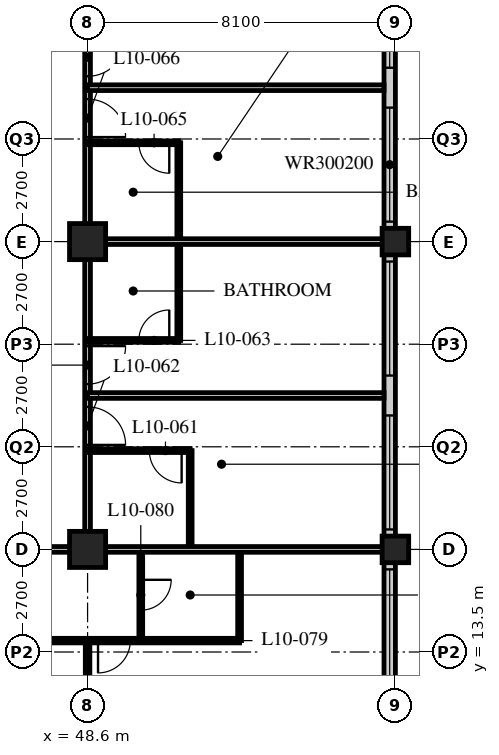
"""IFC4 building model, lengths in metres.
Left out: names, types, materials, properties, quantities, classifications, styles, units other than length and angle.
Written with IfcOpenShell. Run it as: python <this file> out.ifc"""

import sys

from ifc_helpers import new_model, si_unit, direction, frame, frame_2d, origin, origin_2d, place, context, subcontext, project, spatial, rectangle, hollow_rectangle, extrude, element, fill, save


model = new_model("IFC4")
c1 = context("Model", 3, precision=1e-05, world=origin(), true_north=direction((0.0, 1.0)))
c2 = subcontext(c1, "Body", "Model", "MODEL_VIEW")
j1 = project(units=[si_unit("LENGTHUNIT", "METRE"), si_unit("PLANEANGLEUNIT", "RADIAN")], contexts=[c1])
p1 = place(None, origin())
s1 = spatial("IfcSite", under=j1, at=p1, CompositionType="ELEMENT")
p2 = place(p1, origin())
s2 = spatial("IfcBuilding", under=s1, at=p2, CompositionType="ELEMENT")
p3 = place(p2, frame((0.0, 0.0, 46.6)))
s3 = spatial("IfcBuildingStorey", under=s2, at=p3, CompositionType="ELEMENT", Elevation=46.6)
for number, where, z_axis, x_axis in (
    (1, (48.6, 16.2, 0.0), (0.0, 0.0, 1.0), (1.0, 0.0, 0.0)),
    (2, (48.6, 24.3, 0.0), (0.0, 0.0, 1.0), (1.0, 0.0, 0.0)),
):
    element("IfcColumn", number, at=place(p3, frame(where, z_axis=z_axis, x_axis=x_axis)), inside=s3, PredefinedType="COLUMN", context=c2, shape_type="SweptSolid", body=[
        extrude(hollow_rectangle(XDim=0.95, YDim=0.95, WallThickness=0.095, at=origin_2d()), origin(), (0.0, 0.0, 1.0), 3.4),
    ])
for number, where, z_axis, x_axis in (
    (3, (56.7, 16.2, 0.0), (0.0, 0.0, 1.0), (1.0, 0.0, 0.0)),
    (4, (56.7, 24.3, 0.0), (0.0, 0.0, 1.0), (1.0, 0.0, 0.0)),
):
    element("IfcColumn", number, at=place(p3, frame(where, z_axis=z_axis, x_axis=x_axis)), inside=s3, PredefinedType="COLUMN", context=c2, shape_type="SweptSolid", body=[
        extrude(hollow_rectangle(XDim=0.7, YDim=0.7, WallThickness=0.06, at=origin_2d()), origin(), (0.0, 0.0, 1.0), 3.4),
    ])
p4 = place(p3, frame((56.55, 8.4, 0.0), z_axis=(0.0, 0.0, 1.0), x_axis=(0.0, 1.0, 0.0)))
e5 = element("IfcWall", 5, at=p4, inside=s3, PredefinedType="SOLIDWALL", context=c2, shape_type="SweptSolid", body=[
    extrude(rectangle(XDim=32.1, YDim=0.3, at=frame_2d((16.05, 0.0))), origin(), (0.0, 0.0, 1.0), 3.19),
])
p5 = place(p4, frame((0.225, 0.0, 0.9)))
e6 = element("IfcOpeningElement", 6, at=p5, cuts=e5, PredefinedType="OPENING", context=c2, shape_type="SweptSolid", body=[
    extrude(rectangle(XDim=3.0, YDim=2.0, at=frame_2d((1.5, 1.0))), frame((0.0, 0.16, 0.0), z_axis=(0.0, -1.0, 0.0), x_axis=(1.0, 0.0, 0.0)), (0.0, 0.0, 1.0), 0.32),
])
p6 = place(p4, frame((4.275, 0.0, 0.9)))
e7 = element("IfcOpeningElement", 7, at=p6, cuts=e5, PredefinedType="OPENING", context=c2, shape_type="SweptSolid", body=[
    extrude(rectangle(XDim=3.0, YDim=2.0, at=frame_2d((1.5, 1.0))), frame((0.0, 0.16, 0.0), z_axis=(0.0, -1.0, 0.0), x_axis=(1.0, 0.0, 0.0)), (0.0, 0.0, 1.0), 0.32),
])
p7 = place(p4, frame((8.325, 0.0, 0.9)))
e8 = element("IfcOpeningElement", 8, at=p7, cuts=e5, PredefinedType="OPENING", context=c2, shape_type="SweptSolid", body=[
    extrude(rectangle(XDim=3.0, YDim=2.0, at=frame_2d((1.5, 1.0))), frame((0.0, 0.16, 0.0), z_axis=(0.0, -1.0, 0.0), x_axis=(1.0, 0.0, 0.0)), (0.0, 0.0, 1.0), 0.32),
])
p8 = place(p4, frame((12.375, 0.0, 0.9)))
e9 = element("IfcOpeningElement", 9, at=p8, cuts=e5, PredefinedType="OPENING", context=c2, shape_type="SweptSolid", body=[
    extrude(rectangle(XDim=3.0, YDim=2.0, at=frame_2d((1.5, 1.0))), frame((0.0, 0.16, 0.0), z_axis=(0.0, -1.0, 0.0), x_axis=(1.0, 0.0, 0.0)), (0.0, 0.0, 1.0), 0.32),
])
p9 = place(p4, frame((16.425, 0.0, 0.9)))
e10 = element("IfcOpeningElement", 10, at=p9, cuts=e5, PredefinedType="OPENING", context=c2, shape_type="SweptSolid", body=[
    extrude(rectangle(XDim=3.0, YDim=2.0, at=frame_2d((1.5, 1.0))), frame((0.0, 0.16, 0.0), z_axis=(0.0, -1.0, 0.0), x_axis=(1.0, 0.0, 0.0)), (0.0, 0.0, 1.0), 0.32),
])
p10 = place(p4, frame((20.475, 0.0, 0.9)))
e11 = element("IfcOpeningElement", 11, at=p10, cuts=e5, PredefinedType="OPENING", context=c2, shape_type="SweptSolid", body=[
    extrude(rectangle(XDim=3.0, YDim=2.0, at=frame_2d((1.5, 1.0))), frame((0.0, 0.16, 0.0), z_axis=(0.0, -1.0, 0.0), x_axis=(1.0, 0.0, 0.0)), (0.0, 0.0, 1.0), 0.32),
])
p11 = place(p4, frame((24.525, 0.0, 0.9)))
e12 = element("IfcOpeningElement", 12, at=p11, cuts=e5, PredefinedType="OPENING", context=c2, shape_type="SweptSolid", body=[
    extrude(rectangle(XDim=3.0, YDim=2.0, at=frame_2d((1.5, 1.0))), frame((0.0, 0.16, 0.0), z_axis=(0.0, -1.0, 0.0), x_axis=(1.0, 0.0, 0.0)), (0.0, 0.0, 1.0), 0.32),
])
p12 = place(p4, frame((28.575, 0.0, 0.9)))
e13 = element("IfcOpeningElement", 13, at=p12, cuts=e5, PredefinedType="OPENING", context=c2, shape_type="SweptSolid", body=[
    extrude(rectangle(XDim=3.0, YDim=2.0, at=frame_2d((1.5, 1.0))), frame((0.0, 0.16, 0.0), z_axis=(0.0, -1.0, 0.0), x_axis=(1.0, 0.0, 0.0)), (0.0, 0.0, 1.0), 0.32),
])
p13 = place(p3, frame((8.1, 16.2, 0.0), z_axis=(0.0, 0.0, 1.0), x_axis=(1.0, 0.0, 0.0)))
e14 = element("IfcWall", 14, at=p13, inside=s3, PredefinedType="PARTITIONING", context=c2, shape_type="SweptSolid", body=[
    extrude(rectangle(XDim=40.5, YDim=0.15, at=frame_2d((20.25, 0.0))), origin(), (0.0, 0.0, 1.0), 2.578),
])
p14 = place(p13, frame((4.35, 0.0, 0.0)))
e15 = element("IfcOpeningElement", 15, at=p14, cuts=e14, PredefinedType="OPENING", context=c2, shape_type="SweptSolid", body=[
    extrude(rectangle(XDim=1.0, YDim=2.1, at=frame_2d((0.5, 1.05))), frame((0.0, 0.085, 0.0), z_axis=(0.0, -1.0, 0.0), x_axis=(1.0, 0.0, 0.0)), (0.0, 0.0, 1.0), 0.17),
])
p15 = place(p13, frame((10.85, 0.0, 0.0)))
e16 = element("IfcOpeningElement", 16, at=p15, cuts=e14, PredefinedType="OPENING", context=c2, shape_type="SweptSolid", body=[
    extrude(rectangle(XDim=1.0, YDim=2.1, at=frame_2d((0.5, 1.05))), frame((0.0, 0.085, 0.0), z_axis=(0.0, -1.0, 0.0), x_axis=(1.0, 0.0, 0.0)), (0.0, 0.0, 1.0), 0.17),
])
p16 = place(p13, frame((12.75, 0.0, 0.0)))
e17 = element("IfcOpeningElement", 17, at=p16, cuts=e14, PredefinedType="OPENING", context=c2, shape_type="SweptSolid", body=[
    extrude(rectangle(XDim=1.0, YDim=2.1, at=frame_2d((0.5, 1.05))), frame((0.0, 0.085, 0.0), z_axis=(0.0, -1.0, 0.0), x_axis=(1.0, 0.0, 0.0)), (0.0, 0.0, 1.0), 0.17),
])
p17 = place(p13, frame((18.95, 0.0, 0.0)))
e18 = element("IfcOpeningElement", 18, at=p17, cuts=e14, PredefinedType="OPENING", context=c2, shape_type="SweptSolid", body=[
    extrude(rectangle(XDim=1.0, YDim=2.1, at=frame_2d((0.5, 1.05))), frame((0.0, 0.085, 0.0), z_axis=(0.0, -1.0, 0.0), x_axis=(1.0, 0.0, 0.0)), (0.0, 0.0, 1.0), 0.17),
])
p18 = place(p13, frame((20.55, 0.0, 0.0)))
e19 = element("IfcOpeningElement", 19, at=p18, cuts=e14, PredefinedType="OPENING", context=c2, shape_type="SweptSolid", body=[
    extrude(rectangle(XDim=1.0, YDim=2.1, at=frame_2d((0.5, 1.05))), frame((0.0, 0.085, 0.0), z_axis=(0.0, -1.0, 0.0), x_axis=(1.0, 0.0, 0.0)), (0.0, 0.0, 1.0), 0.17),
])
p19 = place(p13, frame((27.05, 0.0, 0.0)))
e20 = element("IfcOpeningElement", 20, at=p19, cuts=e14, PredefinedType="OPENING", context=c2, shape_type="SweptSolid", body=[
    extrude(rectangle(XDim=1.0, YDim=2.1, at=frame_2d((0.5, 1.05))), frame((0.0, 0.085, 0.0), z_axis=(0.0, -1.0, 0.0), x_axis=(1.0, 0.0, 0.0)), (0.0, 0.0, 1.0), 0.17),
])
p20 = place(p13, frame((28.95, 0.0, 0.0)))
e21 = element("IfcOpeningElement", 21, at=p20, cuts=e14, PredefinedType="OPENING", context=c2, shape_type="SweptSolid", body=[
    extrude(rectangle(XDim=1.0, YDim=2.1, at=frame_2d((0.5, 1.05))), frame((0.0, 0.085, 0.0), z_axis=(0.0, -1.0, 0.0), x_axis=(1.0, 0.0, 0.0)), (0.0, 0.0, 1.0), 0.17),
])
p21 = place(p13, frame((34.85, 0.0, 0.0)))
e22 = element("IfcOpeningElement", 22, at=p21, cuts=e14, PredefinedType="OPENING", context=c2, shape_type="SweptSolid", body=[
    extrude(rectangle(XDim=1.0, YDim=2.1, at=frame_2d((0.5, 1.05))), frame((0.0, 0.085, 0.0), z_axis=(0.0, -1.0, 0.0), x_axis=(1.0, 0.0, 0.0)), (0.0, 0.0, 1.0), 0.17),
])
p22 = place(p13, frame((1.525, 0.0, 0.0)))
e23 = element("IfcOpeningElement", 23, at=p22, cuts=e14, PredefinedType="OPENING", context=c2, shape_type="SweptSolid", body=[
    extrude(rectangle(XDim=1.0, YDim=2.1, at=frame_2d((0.5, 1.05))), frame((0.0, 0.085, 0.0), z_axis=(0.0, -1.0, 0.0), x_axis=(1.0, 0.0, 0.0)), (0.0, 0.0, 1.0), 0.17),
])
p23 = place(p13, frame((37.975, 0.0, 0.0)))
e24 = element("IfcOpeningElement", 24, at=p23, cuts=e14, PredefinedType="OPENING", context=c2, shape_type="SweptSolid", body=[
    extrude(rectangle(XDim=1.0, YDim=2.1, at=frame_2d((0.5, 1.05))), frame((0.0, 0.085, 0.0), z_axis=(0.0, -1.0, 0.0), x_axis=(1.0, 0.0, 0.0)), (0.0, 0.0, 1.0), 0.17),
])
p24 = place(p3, frame((48.6, 16.2, 0.0), z_axis=(0.0, 0.0, 1.0), x_axis=(0.0, 1.0, 0.0)))
e25 = element("IfcWall", 25, at=p24, inside=s3, PredefinedType="PARTITIONING", context=c2, shape_type="SweptSolid", body=[
    extrude(rectangle(XDim=26.1, YDim=0.15, at=frame_2d((13.05, 0.0))), origin(), (0.0, 0.0, 1.0), 2.578),
])
p25 = place(p24, frame((2.75, 0.0, 0.0)))
e26 = element("IfcOpeningElement", 26, at=p25, cuts=e25, PredefinedType="OPENING", context=c2, shape_type="SweptSolid", body=[
    extrude(rectangle(XDim=1.0, YDim=2.1, at=frame_2d((0.5, 1.05))), frame((0.0, 0.085, 0.0), z_axis=(0.0, -1.0, 0.0), x_axis=(1.0, 0.0, 0.0)), (0.0, 0.0, 1.0), 0.17),
])
p26 = place(p24, frame((4.35, 0.0, 0.0)))
e27 = element("IfcOpeningElement", 27, at=p26, cuts=e25, PredefinedType="OPENING", context=c2, shape_type="SweptSolid", body=[
    extrude(rectangle(XDim=1.0, YDim=2.1, at=frame_2d((0.5, 1.05))), frame((0.0, 0.085, 0.0), z_axis=(0.0, -1.0, 0.0), x_axis=(1.0, 0.0, 0.0)), (0.0, 0.0, 1.0), 0.17),
])
p27 = place(p24, frame((10.85, 0.0, 0.0)))
e28 = element("IfcOpeningElement", 28, at=p27, cuts=e25, PredefinedType="OPENING", context=c2, shape_type="SweptSolid", body=[
    extrude(rectangle(XDim=1.0, YDim=2.1, at=frame_2d((0.5, 1.05))), frame((0.0, 0.085, 0.0), z_axis=(0.0, -1.0, 0.0), x_axis=(1.0, 0.0, 0.0)), (0.0, 0.0, 1.0), 0.17),
])
p28 = place(p24, frame((12.45, 0.0, 0.0)))
e29 = element("IfcOpeningElement", 29, at=p28, cuts=e25, PredefinedType="OPENING", context=c2, shape_type="SweptSolid", body=[
    extrude(rectangle(XDim=1.0, YDim=2.1, at=frame_2d((0.5, 1.05))), frame((0.0, 0.085, 0.0), z_axis=(0.0, -1.0, 0.0), x_axis=(1.0, 0.0, 0.0)), (0.0, 0.0, 1.0), 0.17),
])
p29 = place(p24, frame((18.65, 0.0, 0.0)))
e30 = element("IfcOpeningElement", 30, at=p29, cuts=e25, PredefinedType="OPENING", context=c2, shape_type="SweptSolid", body=[
    extrude(rectangle(XDim=1.0, YDim=2.1, at=frame_2d((0.5, 1.05))), frame((0.0, 0.085, 0.0), z_axis=(0.0, -1.0, 0.0), x_axis=(1.0, 0.0, 0.0)), (0.0, 0.0, 1.0), 0.17),
])
p30 = place(p24, frame((22.7, 0.0, 0.0)))
e31 = element("IfcOpeningElement", 31, at=p30, cuts=e25, PredefinedType="OPENING", context=c2, shape_type="SweptSolid", body=[
    extrude(rectangle(XDim=1.0, YDim=2.1, at=frame_2d((0.5, 1.05))), frame((0.0, 0.085, 0.0), z_axis=(0.0, -1.0, 0.0), x_axis=(1.0, 0.0, 0.0)), (0.0, 0.0, 1.0), 0.17),
])
p31 = place(p3, frame((51.3, 16.2, 0.0), z_axis=(0.0, 0.0, 1.0), x_axis=(0.0, 1.0, 0.0)))
e32 = element("IfcWall", 32, at=p31, inside=s3, PredefinedType="PARTITIONING", context=c2, shape_type="SweptSolid", body=[
    extrude(rectangle(XDim=2.6, YDim=0.1, at=frame_2d((1.3, 0.0))), origin(), (0.0, 0.0, 1.0), 3.19),
])
p32 = place(p3, frame((48.6, 18.8, 0.0), z_axis=(0.0, 0.0, 1.0), x_axis=(1.0, 0.0, 0.0)))
e33 = element("IfcWall", 33, at=p32, inside=s3, PredefinedType="PARTITIONING", context=c2, shape_type="SweptSolid", body=[
    extrude(rectangle(XDim=2.7, YDim=0.1, at=frame_2d((1.35, 0.0))), origin(), (0.0, 0.0, 1.0), 3.19),
])
p33 = place(p32, frame((1.625, 0.0, 0.0)))
e34 = element("IfcOpeningElement", 34, at=p33, cuts=e33, PredefinedType="OPENING", context=c2, shape_type="SweptSolid", body=[
    extrude(rectangle(XDim=0.85, YDim=2.1, at=frame_2d((0.425, 1.05))), frame((0.0, 0.06, 0.0), z_axis=(0.0, -1.0, 0.0), x_axis=(1.0, 0.0, 0.0)), (0.0, 0.0, 1.0), 0.12),
])
p34 = place(p3, frame((48.6, 20.25, 0.0), z_axis=(0.0, 0.0, 1.0), x_axis=(1.0, 0.0, 0.0)))
e35 = element("IfcWall", 35, at=p34, inside=s3, PredefinedType="PARTITIONING", context=c2, shape_type="SweptSolid", body=[
    extrude(rectangle(XDim=7.8, YDim=0.15, at=frame_2d((3.9, 0.0))), origin(), (0.0, 0.0, 1.0), 3.19),
])
p35 = place(p3, frame((51.0, 21.7, 0.0), z_axis=(0.0, 0.0, 1.0), x_axis=(0.0, 1.0, 0.0)))
e36 = element("IfcWall", 36, at=p35, inside=s3, PredefinedType="PARTITIONING", context=c2, shape_type="SweptSolid", body=[
    extrude(rectangle(XDim=5.2, YDim=0.1, at=frame_2d((2.6, 0.0))), origin(), (0.0, 0.0, 1.0), 3.19),
])
p36 = place(p3, frame((48.6, 21.7, 0.0), z_axis=(0.0, 0.0, 1.0), x_axis=(1.0, 0.0, 0.0)))
e37 = element("IfcWall", 37, at=p36, inside=s3, PredefinedType="PARTITIONING", context=c2, shape_type="SweptSolid", body=[
    extrude(rectangle(XDim=2.4, YDim=0.1, at=frame_2d((1.2, 0.0))), origin(), (0.0, 0.0, 1.0), 3.19),
])
p37 = place(p36, frame((1.35, 0.0, 0.0)))
e38 = element("IfcOpeningElement", 38, at=p37, cuts=e37, PredefinedType="OPENING", context=c2, shape_type="SweptSolid", body=[
    extrude(rectangle(XDim=0.8, YDim=2.1, at=frame_2d((0.4, 1.05))), frame((0.0, 0.06, 0.0), z_axis=(0.0, -1.0, 0.0), x_axis=(1.0, 0.0, 0.0)), (0.0, 0.0, 1.0), 0.12),
])
p38 = place(p3, frame((48.6, 24.3, 0.0), z_axis=(0.0, 0.0, 1.0), x_axis=(1.0, 0.0, 0.0)))
e39 = element("IfcWall", 39, at=p38, inside=s3, PredefinedType="PARTITIONING", context=c2, shape_type="SweptSolid", body=[
    extrude(rectangle(XDim=7.8, YDim=0.15, at=frame_2d((3.9, 0.0))), origin(), (0.0, 0.0, 1.0), 2.578),
])
p39 = place(p3, frame((48.6, 26.9, 0.0), z_axis=(0.0, 0.0, 1.0), x_axis=(1.0, 0.0, 0.0)))
e40 = element("IfcWall", 40, at=p39, inside=s3, PredefinedType="PARTITIONING", context=c2, shape_type="SweptSolid", body=[
    extrude(rectangle(XDim=2.4, YDim=0.1, at=frame_2d((1.2, 0.0))), origin(), (0.0, 0.0, 1.0), 3.19),
])
p40 = place(p39, frame((1.35, 0.0, 0.0)))
e41 = element("IfcOpeningElement", 41, at=p40, cuts=e40, PredefinedType="OPENING", context=c2, shape_type="SweptSolid", body=[
    extrude(rectangle(XDim=0.8, YDim=2.1, at=frame_2d((0.4, 1.05))), frame((0.0, 0.06, 0.0), z_axis=(0.0, -1.0, 0.0), x_axis=(1.0, 0.0, 0.0)), (0.0, 0.0, 1.0), 0.12),
])
p41 = place(p3, frame((48.6, 28.35, 0.0), z_axis=(0.0, 0.0, 1.0), x_axis=(1.0, 0.0, 0.0)))
e42 = element("IfcWall", 42, at=p41, inside=s3, PredefinedType="PARTITIONING", context=c2, shape_type="SweptSolid", body=[
    extrude(rectangle(XDim=7.8, YDim=0.15, at=frame_2d((3.9, 0.0))), origin(), (0.0, 0.0, 1.0), 3.19),
])
p42 = place(p3, frame((44.55, 13.8, 0.0), z_axis=(0.0, 0.0, 1.0), x_axis=(1.0, 0.0, 0.0)))
e43 = element("IfcWall", 43, at=p42, inside=s3, PredefinedType="PARTITIONING", context=c2, shape_type="SweptSolid", body=[
    extrude(rectangle(XDim=8.05, YDim=0.12, at=frame_2d((4.025, 0.0))), origin(), (0.0, 0.0, 1.0), 3.19),
])
p43 = place(p42, frame((0.475, 0.0, 0.0)))
e44 = element("IfcOpeningElement", 44, at=p43, cuts=e43, PredefinedType="OPENING", context=c2, shape_type="SweptSolid", body=[
    extrude(rectangle(XDim=0.85, YDim=2.1, at=frame_2d((0.425, 1.05))), frame((0.0, 0.07, 0.0), z_axis=(0.0, -1.0, 0.0), x_axis=(1.0, 0.0, 0.0)), (0.0, 0.0, 1.0), 0.14),
])
p44 = place(p42, frame((4.325, 0.0, 0.0)))
e45 = element("IfcOpeningElement", 45, at=p44, cuts=e43, PredefinedType="OPENING", context=c2, shape_type="SweptSolid", body=[
    extrude(rectangle(XDim=0.85, YDim=2.1, at=frame_2d((0.425, 1.05))), frame((0.0, 0.07, 0.0), z_axis=(0.0, -1.0, 0.0), x_axis=(1.0, 0.0, 0.0)), (0.0, 0.0, 1.0), 0.14),
])
p45 = place(p3, frame((50.0, 16.2, 0.0), z_axis=(0.0, 0.0, 1.0), x_axis=(0.0, -1.0, 0.0)))
e46 = element("IfcWall", 46, at=p45, inside=s3, PredefinedType="PARTITIONING", context=c2, shape_type="SweptSolid", body=[
    extrude(rectangle(XDim=2.4, YDim=0.1, at=frame_2d((1.2, 0.0))), origin(), (0.0, 0.0, 1.0), 3.19),
])
p46 = place(p45, frame((0.8, 0.0, 0.0)))
e47 = element("IfcOpeningElement", 47, at=p46, cuts=e46, PredefinedType="OPENING", context=c2, shape_type="SweptSolid", body=[
    extrude(rectangle(XDim=0.8, YDim=2.1, at=frame_2d((0.4, 1.05))), frame((0.0, 0.06, 0.0), z_axis=(0.0, -1.0, 0.0), x_axis=(1.0, 0.0, 0.0)), (0.0, 0.0, 1.0), 0.12),
])
p47 = place(p3, frame((52.6, 16.2, 0.0), z_axis=(0.0, 0.0, 1.0), x_axis=(0.0, -1.0, 0.0)))
e48 = element("IfcWall", 48, at=p47, inside=s3, PredefinedType="PARTITIONING", context=c2, shape_type="SweptSolid", body=[
    extrude(rectangle(XDim=2.4, YDim=0.1, at=frame_2d((1.2, 0.0))), origin(), (0.0, 0.0, 1.0), 3.19),
])
p48 = place(p3, frame((48.6, 13.8, 0.0), z_axis=(0.0, 0.0, 1.0), x_axis=(0.0, -1.0, 0.0)))
e49 = element("IfcWall", 49, at=p48, inside=s3, PredefinedType="PARTITIONING", context=c2, shape_type="SweptSolid", body=[
    extrude(rectangle(XDim=9.45, YDim=0.12, at=frame_2d((4.725, 0.0))), origin(), (0.0, 0.0, 1.0), 2.578),
])
p49 = place(p3, frame((48.6, 16.2, 0.0), z_axis=(0.0, 0.0, 1.0), x_axis=(1.0, 0.0, 0.0)))
e50 = element("IfcWall", 50, at=p49, inside=s3, PredefinedType="PARTITIONING", context=c2, shape_type="SweptSolid", body=[
    extrude(rectangle(XDim=7.8, YDim=0.15, at=frame_2d((3.9, 0.0))), origin(), (0.0, 0.0, 1.0), 2.578),
])
p50 = place(p6, origin())
e51 = element("IfcWindow", 51, at=p50, inside=s3, PartitioningType="SINGLE_PANEL", PredefinedType="WINDOW", context=c2, shape_type="SweptSolid", body=[
    extrude(rectangle(XDim=3.0, YDim=2.0, at=frame_2d((1.5, 1.0))), frame((0.0, 0.03, 0.0), z_axis=(0.0, -1.0, 0.0), x_axis=(1.0, 0.0, 0.0)), (0.0, 0.0, 1.0), 0.06),
])
fill(e7, e51)
p51 = place(p7, origin())
e52 = element("IfcWindow", 52, at=p51, inside=s3, PartitioningType="SINGLE_PANEL", PredefinedType="WINDOW", context=c2, shape_type="SweptSolid", body=[
    extrude(rectangle(XDim=3.0, YDim=2.0, at=frame_2d((1.5, 1.0))), frame((0.0, 0.03, 0.0), z_axis=(0.0, -1.0, 0.0), x_axis=(1.0, 0.0, 0.0)), (0.0, 0.0, 1.0), 0.06),
])
fill(e8, e52)
p52 = place(p8, origin())
e53 = element("IfcWindow", 53, at=p52, inside=s3, PartitioningType="SINGLE_PANEL", PredefinedType="WINDOW", context=c2, shape_type="SweptSolid", body=[
    extrude(rectangle(XDim=3.0, YDim=2.0, at=frame_2d((1.5, 1.0))), frame((0.0, 0.03, 0.0), z_axis=(0.0, -1.0, 0.0), x_axis=(1.0, 0.0, 0.0)), (0.0, 0.0, 1.0), 0.06),
])
fill(e9, e53)
p53 = place(p9, origin())
e54 = element("IfcWindow", 54, at=p53, inside=s3, PartitioningType="SINGLE_PANEL", PredefinedType="WINDOW", context=c2, shape_type="SweptSolid", body=[
    extrude(rectangle(XDim=3.0, YDim=2.0, at=frame_2d((1.5, 1.0))), frame((0.0, 0.03, 0.0), z_axis=(0.0, -1.0, 0.0), x_axis=(1.0, 0.0, 0.0)), (0.0, 0.0, 1.0), 0.06),
])
fill(e10, e54)
p54 = place(p10, origin())
e55 = element("IfcWindow", 55, at=p54, inside=s3, PartitioningType="SINGLE_PANEL", PredefinedType="WINDOW", context=c2, shape_type="SweptSolid", body=[
    extrude(rectangle(XDim=3.0, YDim=2.0, at=frame_2d((1.5, 1.0))), frame((0.0, 0.03, 0.0), z_axis=(0.0, -1.0, 0.0), x_axis=(1.0, 0.0, 0.0)), (0.0, 0.0, 1.0), 0.06),
])
fill(e11, e55)
p55 = place(p33, origin())
e56 = element("IfcDoor", 56, at=p55, inside=s3, OperationType="SINGLE_SWING_LEFT", PredefinedType="DOOR", context=c2, shape_type="SweptSolid", body=[
    extrude(rectangle(XDim=0.85, YDim=2.1, at=frame_2d((0.425, 1.05))), frame((0.0, 0.025, 0.0), z_axis=(0.0, -1.0, 0.0), x_axis=(1.0, 0.0, 0.0)), (0.0, 0.0, 1.0), 0.05),
])
fill(e34, e56)
p56 = place(p25, origin())
e57 = element("IfcDoor", 57, at=p56, inside=s3, OperationType="SINGLE_SWING_RIGHT", PredefinedType="DOOR", context=c2, shape_type="SweptSolid", body=[
    extrude(rectangle(XDim=1.0, YDim=2.1, at=frame_2d((0.5, 1.05))), frame((0.0, 0.025, 0.0), z_axis=(0.0, -1.0, 0.0), x_axis=(1.0, 0.0, 0.0)), (0.0, 0.0, 1.0), 0.05),
])
fill(e26, e57)
p57 = place(p37, origin())
e58 = element("IfcDoor", 58, at=p57, inside=s3, OperationType="SINGLE_SWING_RIGHT", PredefinedType="DOOR", context=c2, shape_type="SweptSolid", body=[
    extrude(rectangle(XDim=0.8, YDim=2.1, at=frame_2d((0.4, 1.05))), frame((0.0, 0.025, 0.0), z_axis=(0.0, -1.0, 0.0), x_axis=(1.0, 0.0, 0.0)), (0.0, 0.0, 1.0), 0.05),
])
fill(e38, e58)
p58 = place(p26, origin())
e59 = element("IfcDoor", 59, at=p58, inside=s3, OperationType="SINGLE_SWING_LEFT", PredefinedType="DOOR", context=c2, shape_type="SweptSolid", body=[
    extrude(rectangle(XDim=1.0, YDim=2.1, at=frame_2d((0.5, 1.05))), frame((0.0, 0.025, 0.0), z_axis=(0.0, -1.0, 0.0), x_axis=(1.0, 0.0, 0.0)), (0.0, 0.0, 1.0), 0.05),
])
fill(e27, e59)
p59 = place(p40, origin())
e60 = element("IfcDoor", 60, at=p59, inside=s3, OperationType="SINGLE_SWING_LEFT", PredefinedType="DOOR", context=c2, shape_type="SweptSolid", body=[
    extrude(rectangle(XDim=0.8, YDim=2.1, at=frame_2d((0.4, 1.05))), frame((0.0, 0.025, 0.0), z_axis=(0.0, -1.0, 0.0), x_axis=(1.0, 0.0, 0.0)), (0.0, 0.0, 1.0), 0.05),
])
fill(e41, e60)
p60 = place(p27, origin())
e61 = element("IfcDoor", 61, at=p60, inside=s3, OperationType="SINGLE_SWING_RIGHT", PredefinedType="DOOR", context=c2, shape_type="SweptSolid", body=[
    extrude(rectangle(XDim=1.0, YDim=2.1, at=frame_2d((0.5, 1.05))), frame((0.0, 0.025, 0.0), z_axis=(0.0, -1.0, 0.0), x_axis=(1.0, 0.0, 0.0)), (0.0, 0.0, 1.0), 0.05),
])
fill(e28, e61)
p61 = place(p28, origin())
e62 = element("IfcDoor", 62, at=p61, inside=s3, OperationType="SINGLE_SWING_LEFT", PredefinedType="DOOR", context=c2, shape_type="SweptSolid", body=[
    extrude(rectangle(XDim=1.0, YDim=2.1, at=frame_2d((0.5, 1.05))), frame((0.0, 0.025, 0.0), z_axis=(0.0, -1.0, 0.0), x_axis=(1.0, 0.0, 0.0)), (0.0, 0.0, 1.0), 0.05),
])
fill(e29, e62)
p62 = place(p46, origin())
e63 = element("IfcDoor", 63, at=p62, inside=s3, OperationType="SINGLE_SWING_LEFT", PredefinedType="DOOR", context=c2, shape_type="SweptSolid", body=[
    extrude(rectangle(XDim=0.8, YDim=2.1, at=frame_2d((0.4, 1.05))), frame((0.0, 0.025, 0.0), z_axis=(0.0, -1.0, 0.0), x_axis=(1.0, 0.0, 0.0)), (0.0, 0.0, 1.0), 0.05),
])
fill(e47, e63)
p63 = place(p44, origin())
e64 = element("IfcDoor", 64, at=p63, inside=s3, OperationType="SINGLE_SWING_RIGHT", PredefinedType="DOOR", context=c2, shape_type="SweptSolid", body=[
    extrude(rectangle(XDim=0.85, YDim=2.1, at=frame_2d((0.425, 1.05))), frame((0.0, 0.025, 0.0), z_axis=(0.0, -1.0, 0.0), x_axis=(1.0, 0.0, 0.0)), (0.0, 0.0, 1.0), 0.05),
])
fill(e45, e64)
save(model, sys.argv[1])
